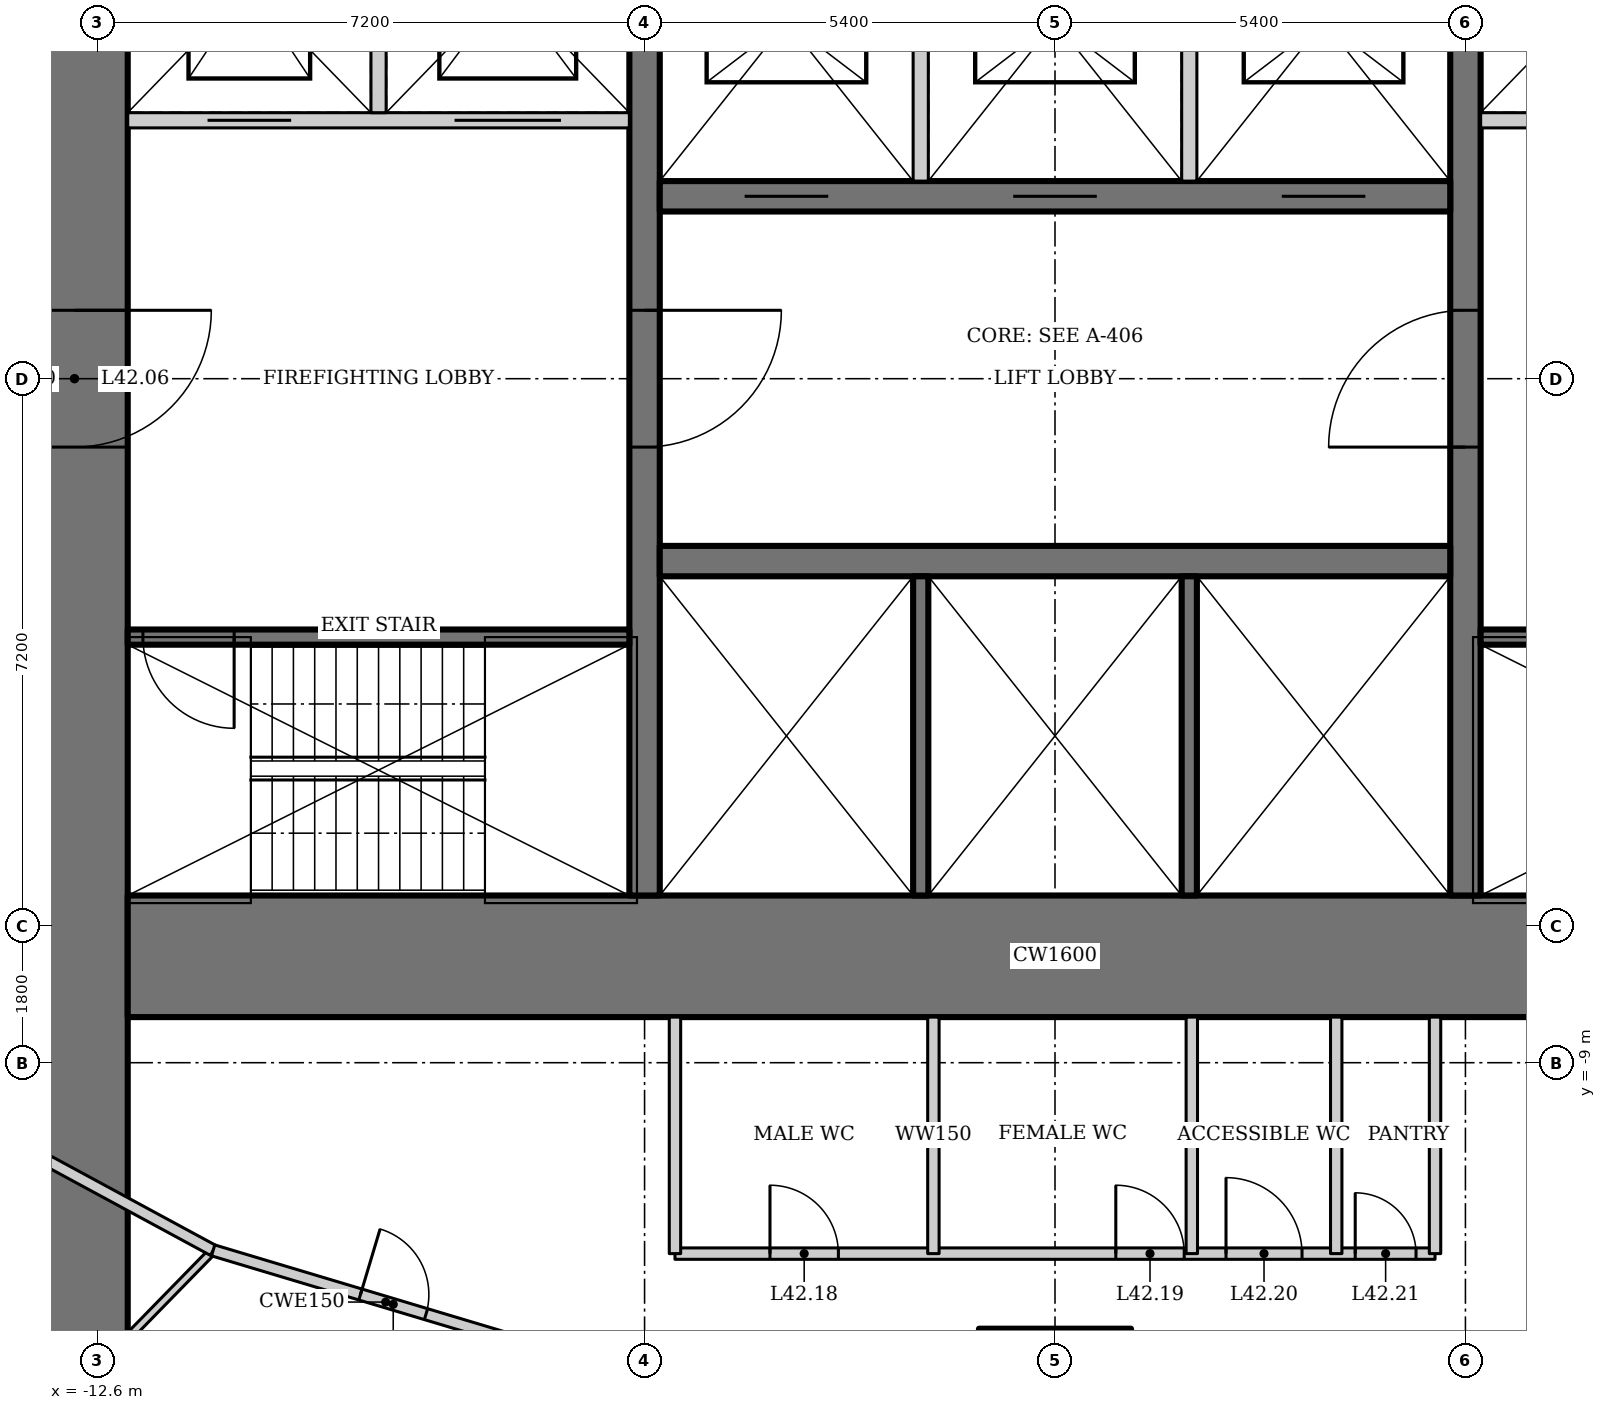
"""IFC4 building model, lengths in metres.
Left out: names, types, materials, properties, quantities, classifications, styles, units other than length and angle.
Written with IfcOpenShell. Run it as: python <this file> out.ifc"""

import sys

from ifc_helpers import new_model, si_unit, direction, frame, frame_2d, origin, origin_2d, place, context, subcontext, project, spatial, rectangle, hollow_rectangle, extrude, element, fill, save


model = new_model("IFC4")
c1 = context("Model", 3, precision=1e-05, world=origin(), true_north=direction((0.0, 1.0)))
c2 = subcontext(c1, "Body", "Model", "MODEL_VIEW")
j1 = project(units=[si_unit("LENGTHUNIT", "METRE"), si_unit("PLANEANGLEUNIT", "RADIAN")], contexts=[c1])
p1 = place(None, origin())
s1 = spatial("IfcSite", under=j1, at=p1, CompositionType="ELEMENT")
p2 = place(p1, origin())
s2 = spatial("IfcBuilding", under=s1, at=p2, CompositionType="ELEMENT")
p3 = place(p2, frame((0.0, 0.0, 180.4)))
s3 = spatial("IfcBuildingStorey", under=s2, at=p3, CompositionType="ELEMENT", Elevation=180.4)
p4 = place(p3, frame((0.0, -13.5, 0.0), z_axis=(0.0, 0.0, 1.0), x_axis=(1.0, 0.0, 0.0)))
e1 = element("IfcColumn", 1, at=p4, inside=s3, PredefinedType="COLUMN", context=c2, shape_type="SweptSolid", body=[
    extrude(hollow_rectangle(XDim=2.0, YDim=2.0, WallThickness=0.17, at=origin_2d()), origin(), (0.0, 0.0, 1.0), 4.2),
])
p5 = place(p3, frame((-12.9, 13.0, 0.0), z_axis=(0.0, 0.0, 1.0), x_axis=(0.0, -1.0, 0.0)))
e2 = element("IfcWall", 2, at=p5, inside=s3, PredefinedType="SHEAR", context=c2, shape_type="SweptSolid", body=[
    extrude(rectangle(XDim=26.0, YDim=1.4, at=frame_2d((13.0, 0.0))), origin(), (0.0, 0.0, 1.0), 4.2),
])
p6 = place(p5, frame((12.1, 0.0, 0.0)))
e3 = element("IfcOpeningElement", 3, at=p6, cuts=e2, PredefinedType="OPENING", context=c2, shape_type="SweptSolid", body=[
    extrude(rectangle(XDim=1.8, YDim=2.1, at=frame_2d((0.9, 1.05))), frame((0.0, 0.71, 0.0), z_axis=(0.0, -1.0, 0.0), x_axis=(1.0, 0.0, 0.0)), (0.0, 0.0, 1.0), 1.42),
])
p7 = place(p3, frame((-12.2, -7.6, 0.0), z_axis=(0.0, 0.0, 1.0), x_axis=(1.0, 0.0, 0.0)))
e4 = element("IfcWall", 4, at=p7, inside=s3, PredefinedType="SHEAR", context=c2, shape_type="SweptSolid", body=[
    extrude(rectangle(XDim=24.4, YDim=1.6, at=frame_2d((12.2, 0.0))), origin(), (0.0, 0.0, 1.0), 4.2),
])
p8 = place(p3, frame((5.4, -6.8, 0.0), z_axis=(0.0, 0.0, 1.0), x_axis=(0.0, 1.0, 0.0)))
e5 = element("IfcWall", 5, at=p8, inside=s3, PredefinedType="SHEAR", context=c2, shape_type="SweptSolid", body=[
    extrude(rectangle(XDim=13.6, YDim=0.4, at=frame_2d((6.8, 0.0))), origin(), (0.0, 0.0, 1.0), 4.2),
])
p9 = place(p8, frame((5.9, 0.0, 0.0)))
e6 = element("IfcOpeningElement", 6, at=p9, cuts=e5, PredefinedType="OPENING", context=c2, shape_type="SweptSolid", body=[
    extrude(rectangle(XDim=1.8, YDim=2.1, at=frame_2d((0.9, 1.05))), frame((0.0, 0.21, 0.0), z_axis=(0.0, -1.0, 0.0), x_axis=(1.0, 0.0, 0.0)), (0.0, 0.0, 1.0), 0.42),
])
p10 = place(p3, frame((-5.4, 6.8, 0.0), z_axis=(0.0, 0.0, 1.0), x_axis=(0.0, -1.0, 0.0)))
e7 = element("IfcWall", 7, at=p10, inside=s3, PredefinedType="SHEAR", context=c2, shape_type="SweptSolid", body=[
    extrude(rectangle(XDim=13.6, YDim=0.4, at=frame_2d((6.8, 0.0))), origin(), (0.0, 0.0, 1.0), 4.2),
])
p11 = place(p10, frame((5.9, 0.0, 0.0)))
e8 = element("IfcOpeningElement", 8, at=p11, cuts=e7, PredefinedType="OPENING", context=c2, shape_type="SweptSolid", body=[
    extrude(rectangle(XDim=1.8, YDim=2.1, at=frame_2d((0.9, 1.05))), frame((0.0, 0.21, 0.0), z_axis=(0.0, -1.0, 0.0), x_axis=(1.0, 0.0, 0.0)), (0.0, 0.0, 1.0), 0.42),
])
p12 = place(p3, frame((-5.2, -2.4, 0.0), z_axis=(0.0, 0.0, 1.0), x_axis=(1.0, 0.0, 0.0)))
e9 = element("IfcWall", 9, at=p12, inside=s3, PredefinedType="SHEAR", context=c2, shape_type="SweptSolid", body=[
    extrude(rectangle(XDim=10.4, YDim=0.4, at=frame_2d((5.2, 0.0))), origin(), (0.0, 0.0, 1.0), 4.2),
])
for number, where, z_axis, x_axis in (
    (10, (-1.767, -2.6, 0.0), (0.0, 0.0, 1.0), (0.0, -1.0, 0.0)),
    (11, (1.767, -2.6, 0.0), (0.0, 0.0, 1.0), (0.0, -1.0, 0.0)),
):
    element("IfcWall", number, at=place(p3, frame(where, z_axis=z_axis, x_axis=x_axis)), inside=s3, PredefinedType="SOLIDWALL", context=c2, shape_type="SweptSolid", body=[
        extrude(rectangle(XDim=4.2, YDim=0.2, at=frame_2d((2.1, 0.0))), origin(), (0.0, 0.0, 1.0), 4.2),
    ])
p13 = place(p3, frame((5.2, 2.4, 0.0), z_axis=(0.0, 0.0, 1.0), x_axis=(-1.0, 0.0, 0.0)))
e12 = element("IfcWall", 12, at=p13, inside=s3, PredefinedType="SHEAR", context=c2, shape_type="SweptSolid", body=[
    extrude(rectangle(XDim=10.4, YDim=0.4, at=frame_2d((5.2, 0.0))), origin(), (0.0, 0.0, 1.0), 4.2),
])
p14 = place(p13, frame((8.183, 0.0, 0.0)))
e13 = element("IfcOpeningElement", 13, at=p14, cuts=e12, PredefinedType="OPENING", context=c2, shape_type="SweptSolid", body=[
    extrude(rectangle(XDim=1.1, YDim=2.2, at=frame_2d((0.55, 1.1))), frame((0.0, 0.21, 0.0), z_axis=(0.0, -1.0, 0.0), x_axis=(1.0, 0.0, 0.0)), (0.0, 0.0, 1.0), 0.42),
])
p15 = place(p13, frame((4.65, 0.0, 0.0)))
e14 = element("IfcOpeningElement", 14, at=p15, cuts=e12, PredefinedType="OPENING", context=c2, shape_type="SweptSolid", body=[
    extrude(rectangle(XDim=1.1, YDim=2.2, at=frame_2d((0.55, 1.1))), frame((0.0, 0.21, 0.0), z_axis=(0.0, -1.0, 0.0), x_axis=(1.0, 0.0, 0.0)), (0.0, 0.0, 1.0), 0.42),
])
p16 = place(p13, frame((1.117, 0.0, 0.0)))
e15 = element("IfcOpeningElement", 15, at=p16, cuts=e12, PredefinedType="OPENING", context=c2, shape_type="SweptSolid", body=[
    extrude(rectangle(XDim=1.1, YDim=2.2, at=frame_2d((0.55, 1.1))), frame((0.0, 0.21, 0.0), z_axis=(0.0, -1.0, 0.0), x_axis=(1.0, 0.0, 0.0)), (0.0, 0.0, 1.0), 0.42),
])
for number, where, z_axis, x_axis in (
    (16, (-1.767, 2.6, 0.0), (0.0, 0.0, 1.0), (0.0, 1.0, 0.0)),
    (17, (1.767, 2.6, 0.0), (0.0, 0.0, 1.0), (0.0, 1.0, 0.0)),
):
    element("IfcWall", number, at=place(p3, frame(where, z_axis=z_axis, x_axis=x_axis)), inside=s3, PredefinedType="SOLIDWALL", context=c2, shape_type="SweptSolid", body=[
        extrude(rectangle(XDim=4.2, YDim=0.2, at=frame_2d((2.1, 0.0))), origin(), (0.0, 0.0, 1.0), 4.2),
    ])
p17 = place(p3, frame((5.6, -3.4, 0.0), z_axis=(0.0, 0.0, 1.0), x_axis=(1.0, 0.0, 0.0)))
e18 = element("IfcWall", 18, at=p17, inside=s3, PredefinedType="SHEAR", context=c2, shape_type="SweptSolid", body=[
    extrude(rectangle(XDim=6.6, YDim=0.2, at=frame_2d((3.3, 0.0))), origin(), (0.0, 0.0, 1.0), 4.2),
])
p18 = place(p17, frame((5.2, 0.0, 0.0)))
e19 = element("IfcOpeningElement", 19, at=p18, cuts=e18, PredefinedType="OPENING", context=c2, shape_type="SweptSolid", body=[
    extrude(rectangle(XDim=1.2, YDim=2.1, at=frame_2d((0.6, 1.05))), frame((0.0, 0.11, 0.0), z_axis=(0.0, -1.0, 0.0), x_axis=(1.0, 0.0, 0.0)), (0.0, 0.0, 1.0), 0.22),
])
p19 = place(p3, frame((12.2, 3.4, 0.0), z_axis=(0.0, 0.0, 1.0), x_axis=(-1.0, 0.0, 0.0)))
e20 = element("IfcWall", 20, at=p19, inside=s3, PredefinedType="SOLIDWALL", context=c2, shape_type="SweptSolid", body=[
    extrude(rectangle(XDim=6.6, YDim=0.2, at=frame_2d((3.3, 0.0))), origin(), (0.0, 0.0, 1.0), 4.2),
])
p20 = place(p19, frame((4.45, 0.0, 0.0)))
e21 = element("IfcOpeningElement", 21, at=p20, cuts=e20, PredefinedType="OPENING", context=c2, shape_type="SweptSolid", body=[
    extrude(rectangle(XDim=1.1, YDim=2.2, at=frame_2d((0.55, 1.1))), frame((0.0, 0.11, 0.0), z_axis=(0.0, -1.0, 0.0), x_axis=(1.0, 0.0, 0.0)), (0.0, 0.0, 1.0), 0.22),
])
p21 = place(p19, frame((0.9, 0.0, 0.0)))
e22 = element("IfcOpeningElement", 22, at=p21, cuts=e20, PredefinedType="OPENING", context=c2, shape_type="SweptSolid", body=[
    extrude(rectangle(XDim=1.4, YDim=2.2, at=frame_2d((0.7, 1.1))), frame((0.0, 0.11, 0.0), z_axis=(0.0, -1.0, 0.0), x_axis=(1.0, 0.0, 0.0)), (0.0, 0.0, 1.0), 0.22),
])
p22 = place(p3, frame((-5.6, -3.4, 0.0), z_axis=(0.0, 0.0, 1.0), x_axis=(-1.0, 0.0, 0.0)))
e23 = element("IfcWall", 23, at=p22, inside=s3, PredefinedType="SHEAR", context=c2, shape_type="SweptSolid", body=[
    extrude(rectangle(XDim=6.6, YDim=0.2, at=frame_2d((3.3, 0.0))), origin(), (0.0, 0.0, 1.0), 4.2),
])
p23 = place(p22, frame((5.2, 0.0, 0.0)))
e24 = element("IfcOpeningElement", 24, at=p23, cuts=e23, PredefinedType="OPENING", context=c2, shape_type="SweptSolid", body=[
    extrude(rectangle(XDim=1.2, YDim=2.1, at=frame_2d((0.6, 1.05))), frame((0.0, 0.11, 0.0), z_axis=(0.0, -1.0, 0.0), x_axis=(1.0, 0.0, 0.0)), (0.0, 0.0, 1.0), 0.22),
])
p24 = place(p3, frame((-12.2, 3.4, 0.0), z_axis=(0.0, 0.0, 1.0), x_axis=(1.0, 0.0, 0.0)))
e25 = element("IfcWall", 25, at=p24, inside=s3, PredefinedType="SOLIDWALL", context=c2, shape_type="SweptSolid", body=[
    extrude(rectangle(XDim=6.6, YDim=0.2, at=frame_2d((3.3, 0.0))), origin(), (0.0, 0.0, 1.0), 4.2),
])
p25 = place(p24, frame((1.05, 0.0, 0.0)))
e26 = element("IfcOpeningElement", 26, at=p25, cuts=e25, PredefinedType="OPENING", context=c2, shape_type="SweptSolid", body=[
    extrude(rectangle(XDim=1.1, YDim=2.2, at=frame_2d((0.55, 1.1))), frame((0.0, 0.11, 0.0), z_axis=(0.0, -1.0, 0.0), x_axis=(1.0, 0.0, 0.0)), (0.0, 0.0, 1.0), 0.22),
])
p26 = place(p24, frame((4.3, 0.0, 0.0)))
e27 = element("IfcOpeningElement", 27, at=p26, cuts=e25, PredefinedType="OPENING", context=c2, shape_type="SweptSolid", body=[
    extrude(rectangle(XDim=1.4, YDim=2.2, at=frame_2d((0.7, 1.1))), frame((0.0, 0.11, 0.0), z_axis=(0.0, -1.0, 0.0), x_axis=(1.0, 0.0, 0.0)), (0.0, 0.0, 1.0), 0.22),
])
p27 = place(p3, frame((-8.9, 3.5, 0.0), z_axis=(0.0, 0.0, 1.0), x_axis=(0.0, 1.0, 0.0)))
e28 = element("IfcWall", 28, at=p27, inside=s3, PredefinedType="SOLIDWALL", context=c2, shape_type="SweptSolid", body=[
    extrude(rectangle(XDim=3.3, YDim=0.2, at=frame_2d((1.65, 0.0))), origin(), (0.0, 0.0, 1.0), 4.2),
])
p28 = place(p3, frame((-16.882, -17.414, 0.0), z_axis=(0.0, 0.0, 1.0), x_axis=(0.698758056249, 0.715358077348, 0.0)))
e29 = element("IfcWall", 29, at=p28, inside=s3, PredefinedType="PARTITIONING", context=c2, shape_type="SweptSolid", body=[
    extrude(rectangle(XDim=8.31, YDim=0.1, at=frame_2d((4.155, 0.0))), origin(), (0.0, 0.0, 1.0), 3.321),
])
p29 = place(p3, frame((-15.696, -8.969, 0.0), z_axis=(0.0, 0.0, 1.0), x_axis=(0.879436285334, -0.476016617397, 0.0)))
e30 = element("IfcWall", 30, at=p29, inside=s3, PredefinedType="PARTITIONING", context=c2, shape_type="SweptSolid", body=[
    extrude(rectangle(XDim=5.253, YDim=0.15, at=frame_2d((2.626, 0.0))), origin(), (0.0, 0.0, 1.0), 4.05),
])
p30 = place(p3, frame((-11.076, -11.469, 0.0), z_axis=(0.0, 0.0, 1.0), x_axis=(0.957933992798, -0.286988615527, 0.0)))
e31 = element("IfcWall", 31, at=p30, inside=s3, PredefinedType="PARTITIONING", context=c2, shape_type="SweptSolid", body=[
    extrude(rectangle(XDim=4.738, YDim=0.15, at=frame_2d((2.369, 0.0))), origin(), (0.0, 0.0, 1.0), 4.05),
])
p31 = place(p30, frame((2.023, 0.0, 0.0)))
e32 = element("IfcOpeningElement", 32, at=p31, cuts=e31, PredefinedType="OPENING", context=c2, shape_type="SweptSolid", body=[
    extrude(rectangle(XDim=0.9, YDim=2.1, at=frame_2d((0.45, 1.05))), frame((0.0, 0.085, 0.0), z_axis=(0.0, -1.0, 0.0), x_axis=(1.0, 0.0, 0.0)), (0.0, 0.0, 1.0), 0.17),
])
p32 = place(p3, frame((-5.0, -11.512, 0.0), z_axis=(0.0, 0.0, 1.0), x_axis=(1.0, 0.0, 0.0)))
e33 = element("IfcWall", 33, at=p32, inside=s3, PredefinedType="SOLIDWALL", context=c2, shape_type="SweptSolid", body=[
    extrude(rectangle(XDim=10.0, YDim=0.15, at=frame_2d((5.0, 0.0))), origin(), (0.0, 0.0, 1.0), 4.05),
])
p33 = place(p32, frame((1.25, 0.0, 0.0)))
e34 = element("IfcOpeningElement", 34, at=p33, cuts=e33, PredefinedType="OPENING", context=c2, shape_type="SweptSolid", body=[
    extrude(rectangle(XDim=0.9, YDim=2.1, at=frame_2d((0.45, 1.05))), frame((0.0, 0.085, 0.0), z_axis=(0.0, -1.0, 0.0), x_axis=(1.0, 0.0, 0.0)), (0.0, 0.0, 1.0), 0.17),
])
p34 = place(p32, frame((5.8, 0.0, 0.0)))
e35 = element("IfcOpeningElement", 35, at=p34, cuts=e33, PredefinedType="OPENING", context=c2, shape_type="SweptSolid", body=[
    extrude(rectangle(XDim=0.9, YDim=2.1, at=frame_2d((0.45, 1.05))), frame((0.0, 0.085, 0.0), z_axis=(0.0, -1.0, 0.0), x_axis=(1.0, 0.0, 0.0)), (0.0, 0.0, 1.0), 0.17),
])
p35 = place(p32, frame((7.25, 0.0, 0.0)))
e36 = element("IfcOpeningElement", 36, at=p35, cuts=e33, PredefinedType="OPENING", context=c2, shape_type="SweptSolid", body=[
    extrude(rectangle(XDim=1.0, YDim=2.1, at=frame_2d((0.5, 1.05))), frame((0.0, 0.085, 0.0), z_axis=(0.0, -1.0, 0.0), x_axis=(1.0, 0.0, 0.0)), (0.0, 0.0, 1.0), 0.17),
])
p36 = place(p32, frame((8.95, 0.0, 0.0)))
e37 = element("IfcOpeningElement", 37, at=p36, cuts=e33, PredefinedType="OPENING", context=c2, shape_type="SweptSolid", body=[
    extrude(rectangle(XDim=0.8, YDim=2.1, at=frame_2d((0.4, 1.05))), frame((0.0, 0.085, 0.0), z_axis=(0.0, -1.0, 0.0), x_axis=(1.0, 0.0, 0.0)), (0.0, 0.0, 1.0), 0.17),
])
for number, where, z_axis, x_axis in (
    (38, (-5.0, -8.4, 0.0), (0.0, 0.0, 1.0), (0.0, -1.0, 0.0)),
    (39, (5.0, -8.4, 0.0), (0.0, 0.0, 1.0), (0.0, -1.0, 0.0)),
    (40, (-1.6, -8.4, 0.0), (0.0, 0.0, 1.0), (0.0, -1.0, 0.0)),
    (41, (1.8, -8.4, 0.0), (0.0, 0.0, 1.0), (0.0, -1.0, 0.0)),
    (42, (3.7, -8.4, 0.0), (0.0, 0.0, 1.0), (0.0, -1.0, 0.0)),
):
    element("IfcWall", number, at=place(p3, frame(where, z_axis=z_axis, x_axis=x_axis)), inside=s3, PredefinedType="SOLIDWALL", context=c2, shape_type="SweptSolid", body=[
        extrude(rectangle(XDim=3.112, YDim=0.15, at=frame_2d((1.556, 0.0))), origin(), (0.0, 0.0, 1.0), 4.05),
    ])
p37 = place(p9, origin())
e43 = element("IfcDoor", 43, at=p37, inside=s3, OperationType="DOUBLE_DOOR_DOUBLE_SWING", PredefinedType="DOOR", context=c2, shape_type="SweptSolid", body=[
    extrude(rectangle(XDim=1.8, YDim=2.1, at=frame_2d((0.9, 1.05))), frame((0.0, 0.025, 0.0), z_axis=(0.0, -1.0, 0.0), x_axis=(1.0, 0.0, 0.0)), (0.0, 0.0, 1.0), 0.05),
])
fill(e6, e43)
p38 = place(p11, origin())
e44 = element("IfcDoor", 44, at=p38, inside=s3, OperationType="DOUBLE_DOOR_DOUBLE_SWING", PredefinedType="DOOR", context=c2, shape_type="SweptSolid", body=[
    extrude(rectangle(XDim=1.8, YDim=2.1, at=frame_2d((0.9, 1.05))), frame((0.0, 0.025, 0.0), z_axis=(0.0, -1.0, 0.0), x_axis=(1.0, 0.0, 0.0)), (0.0, 0.0, 1.0), 0.05),
])
fill(e8, e44)
p39 = place(p23, origin())
e45 = element("IfcDoor", 45, at=p39, inside=s3, OperationType="SINGLE_SWING_RIGHT", PredefinedType="DOOR", context=c2, shape_type="SweptSolid", body=[
    extrude(rectangle(XDim=1.2, YDim=2.1, at=frame_2d((0.6, 1.05))), frame((0.0, 0.025, 0.0), z_axis=(0.0, -1.0, 0.0), x_axis=(1.0, 0.0, 0.0)), (0.0, 0.0, 1.0), 0.05),
])
fill(e24, e45)
p40 = place(p6, origin())
e46 = element("IfcDoor", 46, at=p40, inside=s3, OperationType="DOUBLE_DOOR_DOUBLE_SWING", PredefinedType="DOOR", context=c2, shape_type="SweptSolid", body=[
    extrude(rectangle(XDim=1.8, YDim=2.1, at=frame_2d((0.9, 1.05))), frame((0.0, 0.025, 0.0), z_axis=(0.0, -1.0, 0.0), x_axis=(1.0, 0.0, 0.0)), (0.0, 0.0, 1.0), 0.05),
])
fill(e3, e46)
p41 = place(p14, origin())
e47 = element("IfcDoor", 47, at=p41, inside=s3, OperationType="DOUBLE_DOOR_SLIDING", PredefinedType="DOOR", context=c2, shape_type="SweptSolid", body=[
    extrude(rectangle(XDim=1.1, YDim=2.2, at=frame_2d((0.55, 1.1))), frame((0.0, 0.025, 0.0), z_axis=(0.0, -1.0, 0.0), x_axis=(1.0, 0.0, 0.0)), (0.0, 0.0, 1.0), 0.05),
])
fill(e13, e47)
p42 = place(p15, origin())
e48 = element("IfcDoor", 48, at=p42, inside=s3, OperationType="DOUBLE_DOOR_SLIDING", PredefinedType="DOOR", context=c2, shape_type="SweptSolid", body=[
    extrude(rectangle(XDim=1.1, YDim=2.2, at=frame_2d((0.55, 1.1))), frame((0.0, 0.025, 0.0), z_axis=(0.0, -1.0, 0.0), x_axis=(1.0, 0.0, 0.0)), (0.0, 0.0, 1.0), 0.05),
])
fill(e14, e48)
p43 = place(p16, origin())
e49 = element("IfcDoor", 49, at=p43, inside=s3, OperationType="DOUBLE_DOOR_SLIDING", PredefinedType="DOOR", context=c2, shape_type="SweptSolid", body=[
    extrude(rectangle(XDim=1.1, YDim=2.2, at=frame_2d((0.55, 1.1))), frame((0.0, 0.025, 0.0), z_axis=(0.0, -1.0, 0.0), x_axis=(1.0, 0.0, 0.0)), (0.0, 0.0, 1.0), 0.05),
])
fill(e15, e49)
p44 = place(p25, origin())
e50 = element("IfcDoor", 50, at=p44, inside=s3, OperationType="DOUBLE_DOOR_SLIDING", PredefinedType="DOOR", context=c2, shape_type="SweptSolid", body=[
    extrude(rectangle(XDim=1.1, YDim=2.2, at=frame_2d((0.55, 1.1))), frame((0.0, 0.025, 0.0), z_axis=(0.0, -1.0, 0.0), x_axis=(1.0, 0.0, 0.0)), (0.0, 0.0, 1.0), 0.05),
])
fill(e26, e50)
p45 = place(p26, origin())
e51 = element("IfcDoor", 51, at=p45, inside=s3, OperationType="DOUBLE_DOOR_SLIDING", PredefinedType="DOOR", context=c2, shape_type="SweptSolid", body=[
    extrude(rectangle(XDim=1.4, YDim=2.2, at=frame_2d((0.7, 1.1))), frame((0.0, 0.025, 0.0), z_axis=(0.0, -1.0, 0.0), x_axis=(1.0, 0.0, 0.0)), (0.0, 0.0, 1.0), 0.05),
])
fill(e27, e51)
p46 = place(p33, origin())
e52 = element("IfcDoor", 52, at=p46, inside=s3, OperationType="SINGLE_SWING_LEFT", PredefinedType="DOOR", context=c2, shape_type="SweptSolid", body=[
    extrude(rectangle(XDim=0.9, YDim=2.1, at=frame_2d((0.45, 1.05))), frame((0.0, 0.025, 0.0), z_axis=(0.0, -1.0, 0.0), x_axis=(1.0, 0.0, 0.0)), (0.0, 0.0, 1.0), 0.05),
])
fill(e34, e52)
p47 = place(p34, origin())
e53 = element("IfcDoor", 53, at=p47, inside=s3, OperationType="SINGLE_SWING_LEFT", PredefinedType="DOOR", context=c2, shape_type="SweptSolid", body=[
    extrude(rectangle(XDim=0.9, YDim=2.1, at=frame_2d((0.45, 1.05))), frame((0.0, 0.025, 0.0), z_axis=(0.0, -1.0, 0.0), x_axis=(1.0, 0.0, 0.0)), (0.0, 0.0, 1.0), 0.05),
])
fill(e35, e53)
p48 = place(p35, origin())
e54 = element("IfcDoor", 54, at=p48, inside=s3, OperationType="SINGLE_SWING_LEFT", PredefinedType="DOOR", context=c2, shape_type="SweptSolid", body=[
    extrude(rectangle(XDim=1.0, YDim=2.1, at=frame_2d((0.5, 1.05))), frame((0.0, 0.025, 0.0), z_axis=(0.0, -1.0, 0.0), x_axis=(1.0, 0.0, 0.0)), (0.0, 0.0, 1.0), 0.05),
])
fill(e36, e54)
p49 = place(p36, origin())
e55 = element("IfcDoor", 55, at=p49, inside=s3, OperationType="SINGLE_SWING_LEFT", PredefinedType="DOOR", context=c2, shape_type="SweptSolid", body=[
    extrude(rectangle(XDim=0.8, YDim=2.1, at=frame_2d((0.4, 1.05))), frame((0.0, 0.025, 0.0), z_axis=(0.0, -1.0, 0.0), x_axis=(1.0, 0.0, 0.0)), (0.0, 0.0, 1.0), 0.05),
])
fill(e37, e55)
p50 = place(p31, origin())
e56 = element("IfcDoor", 56, at=p50, inside=s3, OperationType="SINGLE_SWING_LEFT", PredefinedType="DOOR", context=c2, shape_type="SweptSolid", body=[
    extrude(rectangle(XDim=0.9, YDim=2.1, at=frame_2d((0.45, 1.05))), frame((0.0, 0.025, 0.0), z_axis=(0.0, -1.0, 0.0), x_axis=(1.0, 0.0, 0.0)), (0.0, 0.0, 1.0), 0.05),
])
fill(e32, e56)
save(model, sys.argv[1])
